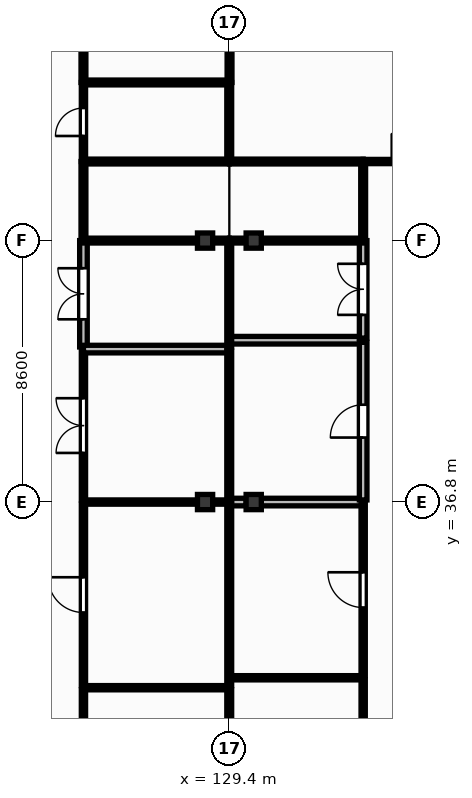
"""IFC4 building model, lengths in metres.
Left out: names, types, materials, properties, quantities, classifications, styles, units other than length and angle.
Written with IfcOpenShell. Run it as: python <this file> out.ifc"""

import sys

from ifc_helpers import new_model, si_unit, direction, frame, frame_2d, origin, origin_2d, place, context, subcontext, project, spatial, rectangle, extrude, element, fill, save


model = new_model("IFC4")
c1 = context("Model", 3, precision=1e-05, world=origin(), true_north=direction((0.0, 1.0)))
c2 = subcontext(c1, "Body", "Model", "MODEL_VIEW")
j1 = project(units=[si_unit("LENGTHUNIT", "METRE"), si_unit("PLANEANGLEUNIT", "RADIAN")], contexts=[c1])
p1 = place(None, origin())
s1 = spatial("IfcSite", under=j1, at=p1, CompositionType="ELEMENT")
p2 = place(p1, origin())
s2 = spatial("IfcBuilding", under=s1, at=p2, CompositionType="ELEMENT")
p3 = place(p2, frame((0.0, 0.0, 4.5)))
s3 = spatial("IfcBuildingStorey", under=s2, at=p3, CompositionType="ELEMENT", Elevation=4.5)
for number, where, z_axis, x_axis in (
    (1, (128.6, 36.8, 0.0), (0.0, 0.0, 1.0), (1.0, 0.0, 0.0)),
    (2, (128.6, 45.4, 0.0), (0.0, 0.0, 1.0), (1.0, 0.0, 0.0)),
    (3, (130.2, 36.8, 0.0), (0.0, 0.0, 1.0), (1.0, 0.0, 0.0)),
    (4, (130.2, 45.4, 0.0), (0.0, 0.0, 1.0), (1.0, 0.0, 0.0)),
):
    element("IfcColumn", number, at=place(p3, frame(where, z_axis=z_axis, x_axis=x_axis)), inside=s3, PredefinedType="COLUMN", context=c2, shape_type="SweptSolid", body=[
        extrude(rectangle(XDim=0.5, YDim=0.5, at=origin_2d()), origin(), (0.0, 0.0, 1.0), 4.22),
    ])
p4 = place(p3, frame((124.6, 27.27, 0.0), z_axis=(0.0, 0.0, 1.0), x_axis=(0.0, 1.0, 0.0)))
e5 = element("IfcWall", 5, at=p4, inside=s3, PredefinedType="PARTITIONING", context=c2, shape_type="SweptSolid", body=[
    extrude(rectangle(XDim=3.354, YDim=0.14, at=frame_2d((1.677, 0.0))), origin(), (0.0, 0.0, 1.0), 4.18),
])
p5 = place(p4, frame((1.217, 0.0, 0.0)))
e6 = element("IfcOpeningElement", 6, at=p5, cuts=e5, PredefinedType="OPENING", context=c2, shape_type="SweptSolid", body=[
    extrude(rectangle(XDim=0.92, YDim=2.1, at=frame_2d((0.46, 1.05))), frame((0.0, 0.08, 0.0), z_axis=(0.0, -1.0, 0.0), x_axis=(1.0, 0.0, 0.0)), (0.0, 0.0, 1.0), 0.16),
])
p6 = place(p3, frame((124.6, 30.764, 0.0), z_axis=(0.0, 0.0, 1.0), x_axis=(0.0, 1.0, 0.0)))
e7 = element("IfcWall", 7, at=p6, inside=s3, PredefinedType="PARTITIONING", context=c2, shape_type="SweptSolid", body=[
    extrude(rectangle(XDim=5.966, YDim=0.14, at=frame_2d((2.983, 0.0))), origin(), (0.0, 0.0, 1.0), 4.18),
])
p7 = place(p6, frame((2.403, 0.0, 0.0)))
e8 = element("IfcOpeningElement", 8, at=p7, cuts=e7, PredefinedType="OPENING", context=c2, shape_type="SweptSolid", body=[
    extrude(rectangle(XDim=1.16, YDim=2.1, at=frame_2d((0.58, 1.05))), frame((0.0, 0.08, 0.0), z_axis=(0.0, -1.0, 0.0), x_axis=(1.0, 0.0, 0.0)), (0.0, 0.0, 1.0), 0.16),
])
p8 = place(p3, frame((124.6, 30.694, 0.0), z_axis=(0.0, 0.0, 1.0), x_axis=(1.0, 0.0, 0.0)))
e9 = element("IfcWall", 9, at=p8, inside=s3, PredefinedType="PARTITIONING", context=c2, shape_type="SweptSolid", body=[
    extrude(rectangle(XDim=4.795, YDim=0.14, at=frame_2d((2.397, 0.0))), origin(), (0.0, 0.0, 1.0), 4.18),
])
p9 = place(p3, frame((124.6, 36.87, 0.0), z_axis=(0.0, 0.0, 1.0), x_axis=(0.0, 1.0, 0.0)))
e10 = element("IfcWall", 10, at=p9, inside=s3, PredefinedType="PARTITIONING", context=c2, shape_type="SweptSolid", body=[
    extrude(rectangle(XDim=4.891, YDim=0.14, at=frame_2d((2.445, 0.0))), origin(), (0.0, 0.0, 1.0), 4.18),
])
p10 = place(p9, frame((1.545, 0.0, 0.0)))
e11 = element("IfcOpeningElement", 11, at=p10, cuts=e10, PredefinedType="OPENING", context=c2, shape_type="SweptSolid", body=[
    extrude(rectangle(XDim=1.8, YDim=2.3, at=frame_2d((0.9, 1.15))), frame((0.0, 0.08, 0.0), z_axis=(0.0, -1.0, 0.0), x_axis=(1.0, 0.0, 0.0)), (0.0, 0.0, 1.0), 0.16),
])
p11 = place(p3, frame((124.6, 36.8, 0.0), z_axis=(0.0, 0.0, 1.0), x_axis=(1.0, 0.0, 0.0)))
e12 = element("IfcWall", 12, at=p11, inside=s3, PredefinedType="PARTITIONING", context=c2, shape_type="SweptSolid", body=[
    extrude(rectangle(XDim=3.75, YDim=0.14, at=frame_2d((1.875, 0.0))), origin(), (0.0, 0.0, 1.0), 3.52),
])
p12 = place(p3, frame((128.85, 36.8, 0.0), z_axis=(0.0, 0.0, 1.0), x_axis=(1.0, 0.0, 0.0)))
e13 = element("IfcWall", 13, at=p12, inside=s3, PredefinedType="PARTITIONING", context=c2, shape_type="SweptSolid", body=[
    extrude(rectangle(XDim=0.545, YDim=0.14, at=frame_2d((0.272, 0.0))), origin(), (0.0, 0.0, 1.0), 4.18),
])
p13 = place(p3, frame((124.6, 41.901, 0.0), z_axis=(0.0, 0.0, 1.0), x_axis=(0.0, 1.0, 0.0)))
e14 = element("IfcWall", 14, at=p13, inside=s3, PredefinedType="SOLIDWALL", context=c2, shape_type="SweptSolid", body=[
    extrude(rectangle(XDim=3.499, YDim=0.25, at=frame_2d((1.75, 0.0))), origin(), (0.0, 0.0, 1.0), 4.18),
])
p14 = place(p13, frame((0.909, 0.0, 0.0)))
e15 = element("IfcOpeningElement", 15, at=p14, cuts=e14, PredefinedType="OPENING", context=c2, shape_type="SweptSolid", body=[
    extrude(rectangle(XDim=1.68, YDim=2.3, at=frame_2d((0.84, 1.15))), frame((0.0, 0.135, 0.0), z_axis=(0.0, -1.0, 0.0), x_axis=(1.0, 0.0, 0.0)), (0.0, 0.0, 1.0), 0.27),
])
p15 = place(p3, frame((124.6, 41.831, 0.0), z_axis=(0.0, 0.0, 1.0), x_axis=(1.0, 0.0, 0.0)))
e16 = element("IfcWall", 16, at=p15, inside=s3, PredefinedType="SOLIDWALL", context=c2, shape_type="SweptSolid", body=[
    extrude(rectangle(XDim=4.795, YDim=0.25, at=frame_2d((2.397, 0.0))), origin(), (0.0, 0.0, 1.0), 4.18),
])
p16 = place(p3, frame((124.6, 48.0, 0.0), z_axis=(0.0, 0.0, 1.0), x_axis=(0.0, 1.0, 0.0)))
e17 = element("IfcWall", 17, at=p16, inside=s3, PredefinedType="PARTITIONING", context=c2, shape_type="SweptSolid", body=[
    extrude(rectangle(XDim=2.6, YDim=0.14, at=frame_2d((1.3, 0.0))), origin(), (0.0, 0.0, 1.0), 4.18),
])
p17 = place(p16, frame((0.84, 0.0, 0.0)))
e18 = element("IfcOpeningElement", 18, at=p17, cuts=e17, PredefinedType="OPENING", context=c2, shape_type="SweptSolid", body=[
    extrude(rectangle(XDim=0.92, YDim=2.1, at=frame_2d((0.46, 1.05))), frame((0.0, 0.08, 0.0), z_axis=(0.0, -1.0, 0.0), x_axis=(1.0, 0.0, 0.0)), (0.0, 0.0, 1.0), 0.16),
])
p18 = place(p3, frame((129.405, 31.021, 0.0), z_axis=(0.0, 0.0, 1.0), x_axis=(1.0, 0.0, 0.0)))
e19 = element("IfcWall", 19, at=p18, inside=s3, PredefinedType="PARTITIONING", context=c2, shape_type="SweptSolid", body=[
    extrude(rectangle(XDim=4.395, YDim=0.14, at=frame_2d((2.198, 0.0))), origin(), (0.0, 0.0, 1.0), 4.18),
])
p19 = place(p3, frame((129.405, 36.8, 0.0), z_axis=(0.0, 0.0, 1.0), x_axis=(1.0, 0.0, 0.0)))
e20 = element("IfcWall", 20, at=p19, inside=s3, PredefinedType="SOLIDWALL", context=c2, shape_type="SweptSolid", body=[
    extrude(rectangle(XDim=0.545, YDim=0.25, at=frame_2d((0.272, 0.0))), origin(), (0.0, 0.0, 1.0), 4.18),
])
p20 = place(p3, frame((130.45, 36.8, 0.0), z_axis=(0.0, 0.0, 1.0), x_axis=(1.0, 0.0, 0.0)))
e21 = element("IfcWall", 21, at=p20, inside=s3, PredefinedType="SOLIDWALL", context=c2, shape_type="SweptSolid", body=[
    extrude(rectangle(XDim=3.35, YDim=0.25, at=frame_2d((1.675, 0.0))), origin(), (0.0, 0.0, 1.0), 3.52),
])
p21 = place(p3, frame((129.405, 42.123, 0.0), z_axis=(0.0, 0.0, 1.0), x_axis=(1.0, 0.0, 0.0)))
e22 = element("IfcWall", 22, at=p21, inside=s3, PredefinedType="SOLIDWALL", context=c2, shape_type="SweptSolid", body=[
    extrude(rectangle(XDim=4.395, YDim=0.25, at=frame_2d((2.198, 0.0))), origin(), (0.0, 0.0, 1.0), 4.18),
])
p22 = place(p3, frame((133.8, 27.27, 0.0), z_axis=(0.0, 0.0, 1.0), x_axis=(0.0, 1.0, 0.0)))
e23 = element("IfcWall", 23, at=p22, inside=s3, PredefinedType="PARTITIONING", context=c2, shape_type="SweptSolid", body=[
    extrude(rectangle(XDim=3.681, YDim=0.14, at=frame_2d((1.84, 0.0))), origin(), (0.0, 0.0, 1.0), 4.18),
])
p23 = place(p22, frame((1.381, 0.0, 0.0)))
e24 = element("IfcOpeningElement", 24, at=p23, cuts=e23, PredefinedType="OPENING", context=c2, shape_type="SweptSolid", body=[
    extrude(rectangle(XDim=0.92, YDim=2.1, at=frame_2d((0.46, 1.05))), frame((0.0, 0.08, 0.0), z_axis=(0.0, -1.0, 0.0), x_axis=(1.0, 0.0, 0.0)), (0.0, 0.0, 1.0), 0.16),
])
p24 = place(p3, frame((133.8, 31.091, 0.0), z_axis=(0.0, 0.0, 1.0), x_axis=(0.0, 1.0, 0.0)))
e25 = element("IfcWall", 25, at=p24, inside=s3, PredefinedType="PARTITIONING", context=c2, shape_type="SweptSolid", body=[
    extrude(rectangle(XDim=5.639, YDim=0.14, at=frame_2d((2.819, 0.0))), origin(), (0.0, 0.0, 1.0), 4.18),
])
p25 = place(p24, frame((2.24, 0.0, 0.0)))
e26 = element("IfcOpeningElement", 26, at=p25, cuts=e25, PredefinedType="OPENING", context=c2, shape_type="SweptSolid", body=[
    extrude(rectangle(XDim=1.16, YDim=2.1, at=frame_2d((0.58, 1.05))), frame((0.0, 0.08, 0.0), z_axis=(0.0, -1.0, 0.0), x_axis=(1.0, 0.0, 0.0)), (0.0, 0.0, 1.0), 0.16),
])
p26 = place(p3, frame((133.8, 36.87, 0.0), z_axis=(0.0, 0.0, 1.0), x_axis=(0.0, 1.0, 0.0)))
e27 = element("IfcWall", 27, at=p26, inside=s3, PredefinedType="SOLIDWALL", context=c2, shape_type="SweptSolid", body=[
    extrude(rectangle(XDim=5.183, YDim=0.25, at=frame_2d((2.591, 0.0))), origin(), (0.0, 0.0, 1.0), 4.18),
])
p27 = place(p26, frame((2.052, 0.0, 0.0)))
e28 = element("IfcOpeningElement", 28, at=p27, cuts=e27, PredefinedType="OPENING", context=c2, shape_type="SweptSolid", body=[
    extrude(rectangle(XDim=1.08, YDim=2.15, at=frame_2d((0.54, 1.075))), frame((0.0, 0.135, 0.0), z_axis=(0.0, -1.0, 0.0), x_axis=(1.0, 0.0, 0.0)), (0.0, 0.0, 1.0), 0.27),
])
p28 = place(p3, frame((133.8, 42.193, 0.0), z_axis=(0.0, 0.0, 1.0), x_axis=(0.0, 1.0, 0.0)))
e29 = element("IfcWall", 29, at=p28, inside=s3, PredefinedType="SOLIDWALL", context=c2, shape_type="SweptSolid", body=[
    extrude(rectangle(XDim=3.207, YDim=0.25, at=frame_2d((1.604, 0.0))), origin(), (0.0, 0.0, 1.0), 4.18),
])
p29 = place(p28, frame((0.763, 0.0, 0.0)))
e30 = element("IfcOpeningElement", 30, at=p29, cuts=e29, PredefinedType="OPENING", context=c2, shape_type="SweptSolid", body=[
    extrude(rectangle(XDim=1.68, YDim=2.3, at=frame_2d((0.84, 1.15))), frame((0.0, 0.135, 0.0), z_axis=(0.0, -1.0, 0.0), x_axis=(1.0, 0.0, 0.0)), (0.0, 0.0, 1.0), 0.27),
])
p30 = place(p3, frame((133.8, 48.0, 0.0), z_axis=(0.0, 0.0, 1.0), x_axis=(1.0, 0.0, 0.0)))
e31 = element("IfcWall", 31, at=p30, inside=s3, PredefinedType="PARTITIONING", context=c2, shape_type="SweptSolid", body=[
    extrude(rectangle(XDim=2.8, YDim=0.14, at=frame_2d((1.4, 0.0))), origin(), (0.0, 0.0, 1.0), 4.18),
])
p31 = place(p30, frame((0.94, 0.0, 0.0)))
e32 = element("IfcOpeningElement", 32, at=p31, cuts=e31, PredefinedType="OPENING", context=c2, shape_type="SweptSolid", body=[
    extrude(rectangle(XDim=0.92, YDim=2.1, at=frame_2d((0.46, 1.05))), frame((0.0, 0.08, 0.0), z_axis=(0.0, -1.0, 0.0), x_axis=(1.0, 0.0, 0.0)), (0.0, 0.0, 1.0), 0.16),
])
p32 = place(p3, frame((124.6, 45.4, 0.0), z_axis=(0.0, 0.0, 1.0), x_axis=(0.0, 1.0, 0.0)))
e33 = element("IfcWall", 33, at=p32, inside=s3, PredefinedType="PARTITIONING", context=c2, shape_type="SweptSolid", body=[
    extrude(rectangle(XDim=2.6, YDim=0.16, at=frame_2d((1.3, 0.0))), origin(), (0.0, 0.0, 1.0), 4.18),
])
p33 = place(p3, frame((124.6, 50.6, 0.0), z_axis=(0.0, 0.0, 1.0), x_axis=(0.0, 1.0, 0.0)))
e34 = element("IfcWall", 34, at=p33, inside=s3, PredefinedType="PARTITIONING", context=c2, shape_type="SweptSolid", body=[
    extrude(rectangle(XDim=2.0, YDim=0.16, at=frame_2d((1.0, 0.0))), origin(), (0.0, 0.0, 1.0), 4.18),
])
p34 = place(p3, frame((124.6, 48.0, 0.0), z_axis=(0.0, 0.0, 1.0), x_axis=(1.0, 0.0, 0.0)))
e35 = element("IfcWall", 35, at=p34, inside=s3, PredefinedType="PARTITIONING", context=c2, shape_type="SweptSolid", body=[
    extrude(rectangle(XDim=4.795, YDim=0.16, at=frame_2d((2.397, 0.0))), origin(), (0.0, 0.0, 1.0), 4.18),
])
p35 = place(p3, frame((129.395, 48.0, 0.0), z_axis=(0.0, 0.0, 1.0), x_axis=(0.0, 1.0, 0.0)))
e36 = element("IfcWall", 36, at=p35, inside=s3, PredefinedType="PARTITIONING", context=c2, shape_type="SweptSolid", body=[
    extrude(rectangle(XDim=2.6, YDim=0.16, at=frame_2d((1.3, 0.0))), origin(), (0.0, 0.0, 1.0), 4.18),
])
p36 = place(p3, frame((129.395, 50.6, 0.0), z_axis=(0.0, 0.0, 1.0), x_axis=(-1.0, 0.0, 0.0)))
e37 = element("IfcWall", 37, at=p36, inside=s3, PredefinedType="PARTITIONING", context=c2, shape_type="SweptSolid", body=[
    extrude(rectangle(XDim=4.795, YDim=0.16, at=frame_2d((2.397, 0.0))), origin(), (0.0, 0.0, 1.0), 4.18),
])
p37 = place(p3, frame((129.405, 48.0, 0.0), z_axis=(0.0, 0.0, 1.0), x_axis=(1.0, 0.0, 0.0)))
e38 = element("IfcWall", 38, at=p37, inside=s3, PredefinedType="PARTITIONING", context=c2, shape_type="SweptSolid", body=[
    extrude(rectangle(XDim=4.395, YDim=0.16, at=frame_2d((2.198, 0.0))), origin(), (0.0, 0.0, 1.0), 4.18),
])
p38 = place(p3, frame((129.405, 50.6, 0.0), z_axis=(0.0, 0.0, 1.0), x_axis=(0.0, 1.0, 0.0)))
e39 = element("IfcWall", 39, at=p38, inside=s3, PredefinedType="PARTITIONING", context=c2, shape_type="SweptSolid", body=[
    extrude(rectangle(XDim=1.4, YDim=0.16, at=frame_2d((0.7, 0.0))), origin(), (0.0, 0.0, 1.0), 4.18),
])
p39 = place(p3, frame((133.8, 45.4, 0.0), z_axis=(0.0, 0.0, 1.0), x_axis=(0.0, 1.0, 0.0)))
e40 = element("IfcWall", 40, at=p39, inside=s3, PredefinedType="PARTITIONING", context=c2, shape_type="SweptSolid", body=[
    extrude(rectangle(XDim=2.53, YDim=0.16, at=frame_2d((1.265, 0.0))), origin(), (0.0, 0.0, 1.0), 4.18),
])
p40 = place(p3, frame((129.395, 27.27, 0.0), z_axis=(0.0, 0.0, 1.0), x_axis=(0.0, 1.0, 0.0)))
e41 = element("IfcWall", 41, at=p40, inside=s3, PredefinedType="PARTITIONING", context=c2, shape_type="SweptSolid", body=[
    extrude(rectangle(XDim=3.354, YDim=0.16, at=frame_2d((1.677, 0.0))), origin(), (0.0, 0.0, 1.0), 4.18),
])
p41 = place(p3, frame((129.395, 30.764, 0.0), z_axis=(0.0, 0.0, 1.0), x_axis=(0.0, 1.0, 0.0)))
e42 = element("IfcWall", 42, at=p41, inside=s3, PredefinedType="PARTITIONING", context=c2, shape_type="SweptSolid", body=[
    extrude(rectangle(XDim=5.966, YDim=0.16, at=frame_2d((2.983, 0.0))), origin(), (0.0, 0.0, 1.0), 4.18),
])
p42 = place(p3, frame((129.395, 36.87, 0.0), z_axis=(0.0, 0.0, 1.0), x_axis=(0.0, 1.0, 0.0)))
e43 = element("IfcWall", 43, at=p42, inside=s3, PredefinedType="PARTITIONING", context=c2, shape_type="SweptSolid", body=[
    extrude(rectangle(XDim=4.891, YDim=0.16, at=frame_2d((2.445, 0.0))), origin(), (0.0, 0.0, 1.0), 4.18),
])
p43 = place(p3, frame((129.395, 41.901, 0.0), z_axis=(0.0, 0.0, 1.0), x_axis=(0.0, 1.0, 0.0)))
e44 = element("IfcWall", 44, at=p43, inside=s3, PredefinedType="PARTITIONING", context=c2, shape_type="SweptSolid", body=[
    extrude(rectangle(XDim=3.499, YDim=0.16, at=frame_2d((1.75, 0.0))), origin(), (0.0, 0.0, 1.0), 4.18),
])
p44 = place(p3, frame((129.395, 45.4, 0.0), z_axis=(0.0, 0.0, 1.0), x_axis=(-1.0, 0.0, 0.0)))
e45 = element("IfcWall", 45, at=p44, inside=s3, PredefinedType="PARTITIONING", context=c2, shape_type="SweptSolid", body=[
    extrude(rectangle(XDim=0.545, YDim=0.16, at=frame_2d((0.272, 0.0))), origin(), (0.0, 0.0, 1.0), 4.18),
])
p45 = place(p3, frame((128.35, 45.4, 0.0), z_axis=(0.0, 0.0, 1.0), x_axis=(-1.0, 0.0, 0.0)))
e46 = element("IfcWall", 46, at=p45, inside=s3, PredefinedType="PARTITIONING", context=c2, shape_type="SweptSolid", body=[
    extrude(rectangle(XDim=3.75, YDim=0.16, at=frame_2d((1.875, 0.0))), origin(), (0.0, 0.0, 1.0), 3.52),
])
p46 = place(p3, frame((133.8, 45.4, 0.0), z_axis=(0.0, 0.0, 1.0), x_axis=(-1.0, 0.0, 0.0)))
e47 = element("IfcWall", 47, at=p46, inside=s3, PredefinedType="PARTITIONING", context=c2, shape_type="SweptSolid", body=[
    extrude(rectangle(XDim=3.35, YDim=0.16, at=frame_2d((1.675, 0.0))), origin(), (0.0, 0.0, 1.0), 3.52),
])
p47 = place(p3, frame((129.95, 45.4, 0.0), z_axis=(0.0, 0.0, 1.0), x_axis=(-1.0, 0.0, 0.0)))
e48 = element("IfcWall", 48, at=p47, inside=s3, PredefinedType="PARTITIONING", context=c2, shape_type="SweptSolid", body=[
    extrude(rectangle(XDim=0.545, YDim=0.16, at=frame_2d((0.272, 0.0))), origin(), (0.0, 0.0, 1.0), 4.18),
])
p48 = place(p17, origin())
e49 = element("IfcDoor", 49, at=p48, inside=s3, OperationType="SINGLE_SWING_LEFT", PredefinedType="DOOR", context=c2, shape_type="SweptSolid", body=[
    extrude(rectangle(XDim=0.92, YDim=2.1, at=frame_2d((0.46, 1.05))), frame((0.0, 0.025, 0.0), z_axis=(0.0, -1.0, 0.0), x_axis=(1.0, 0.0, 0.0)), (0.0, 0.0, 1.0), 0.05),
])
fill(e18, e49)
p49 = place(p31, origin())
e50 = element("IfcDoor", 50, at=p49, inside=s3, OperationType="SINGLE_SWING_LEFT", PredefinedType="DOOR", context=c2, shape_type="SweptSolid", body=[
    extrude(rectangle(XDim=0.92, YDim=2.1, at=frame_2d((0.46, 1.05))), frame((0.0, 0.025, 0.0), z_axis=(0.0, -1.0, 0.0), x_axis=(1.0, 0.0, 0.0)), (0.0, 0.0, 1.0), 0.05),
])
fill(e32, e50)
p50 = place(p7, origin())
e51 = element("IfcDoor", 51, at=p50, inside=s3, OperationType="SINGLE_SWING_RIGHT", PredefinedType="DOOR", context=c2, shape_type="SweptSolid", body=[
    extrude(rectangle(XDim=1.16, YDim=2.1, at=frame_2d((0.58, 1.05))), frame((0.0, 0.025, 0.0), z_axis=(0.0, -1.0, 0.0), x_axis=(1.0, 0.0, 0.0)), (0.0, 0.0, 1.0), 0.05),
])
fill(e8, e51)
p51 = place(p10, origin())
e52 = element("IfcDoor", 52, at=p51, inside=s3, OperationType="DOUBLE_DOOR_SINGLE_SWING", PredefinedType="DOOR", context=c2, shape_type="SweptSolid", body=[
    extrude(rectangle(XDim=1.8, YDim=2.3, at=frame_2d((0.9, 1.15))), frame((0.0, 0.025, 0.0), z_axis=(0.0, -1.0, 0.0), x_axis=(1.0, 0.0, 0.0)), (0.0, 0.0, 1.0), 0.05),
])
fill(e11, e52)
p52 = place(p14, origin())
e53 = element("IfcDoor", 53, at=p52, inside=s3, OperationType="DOUBLE_DOOR_SINGLE_SWING", PredefinedType="DOOR", context=c2, shape_type="SweptSolid", body=[
    extrude(rectangle(XDim=1.68, YDim=2.3, at=frame_2d((0.84, 1.15))), frame((0.0, 0.025, 0.0), z_axis=(0.0, -1.0, 0.0), x_axis=(1.0, 0.0, 0.0)), (0.0, 0.0, 1.0), 0.05),
])
fill(e15, e53)
p53 = place(p25, origin())
e54 = element("IfcDoor", 54, at=p53, inside=s3, OperationType="SINGLE_SWING_RIGHT", PredefinedType="DOOR", context=c2, shape_type="SweptSolid", body=[
    extrude(rectangle(XDim=1.16, YDim=2.1, at=frame_2d((0.58, 1.05))), frame((0.0, 0.025, 0.0), z_axis=(0.0, -1.0, 0.0), x_axis=(1.0, 0.0, 0.0)), (0.0, 0.0, 1.0), 0.05),
])
fill(e26, e54)
p54 = place(p27, origin())
e55 = element("IfcDoor", 55, at=p54, inside=s3, OperationType="SINGLE_SWING_LEFT", PredefinedType="DOOR", context=c2, shape_type="SweptSolid", body=[
    extrude(rectangle(XDim=1.08, YDim=2.15, at=frame_2d((0.54, 1.075))), frame((0.0, 0.025, 0.0), z_axis=(0.0, -1.0, 0.0), x_axis=(1.0, 0.0, 0.0)), (0.0, 0.0, 1.0), 0.05),
])
fill(e28, e55)
p55 = place(p29, origin())
e56 = element("IfcDoor", 56, at=p55, inside=s3, OperationType="DOUBLE_DOOR_SINGLE_SWING", PredefinedType="DOOR", context=c2, shape_type="SweptSolid", body=[
    extrude(rectangle(XDim=1.68, YDim=2.3, at=frame_2d((0.84, 1.15))), frame((0.0, 0.025, 0.0), z_axis=(0.0, -1.0, 0.0), x_axis=(1.0, 0.0, 0.0)), (0.0, 0.0, 1.0), 0.05),
])
fill(e30, e56)
save(model, sys.argv[1])
